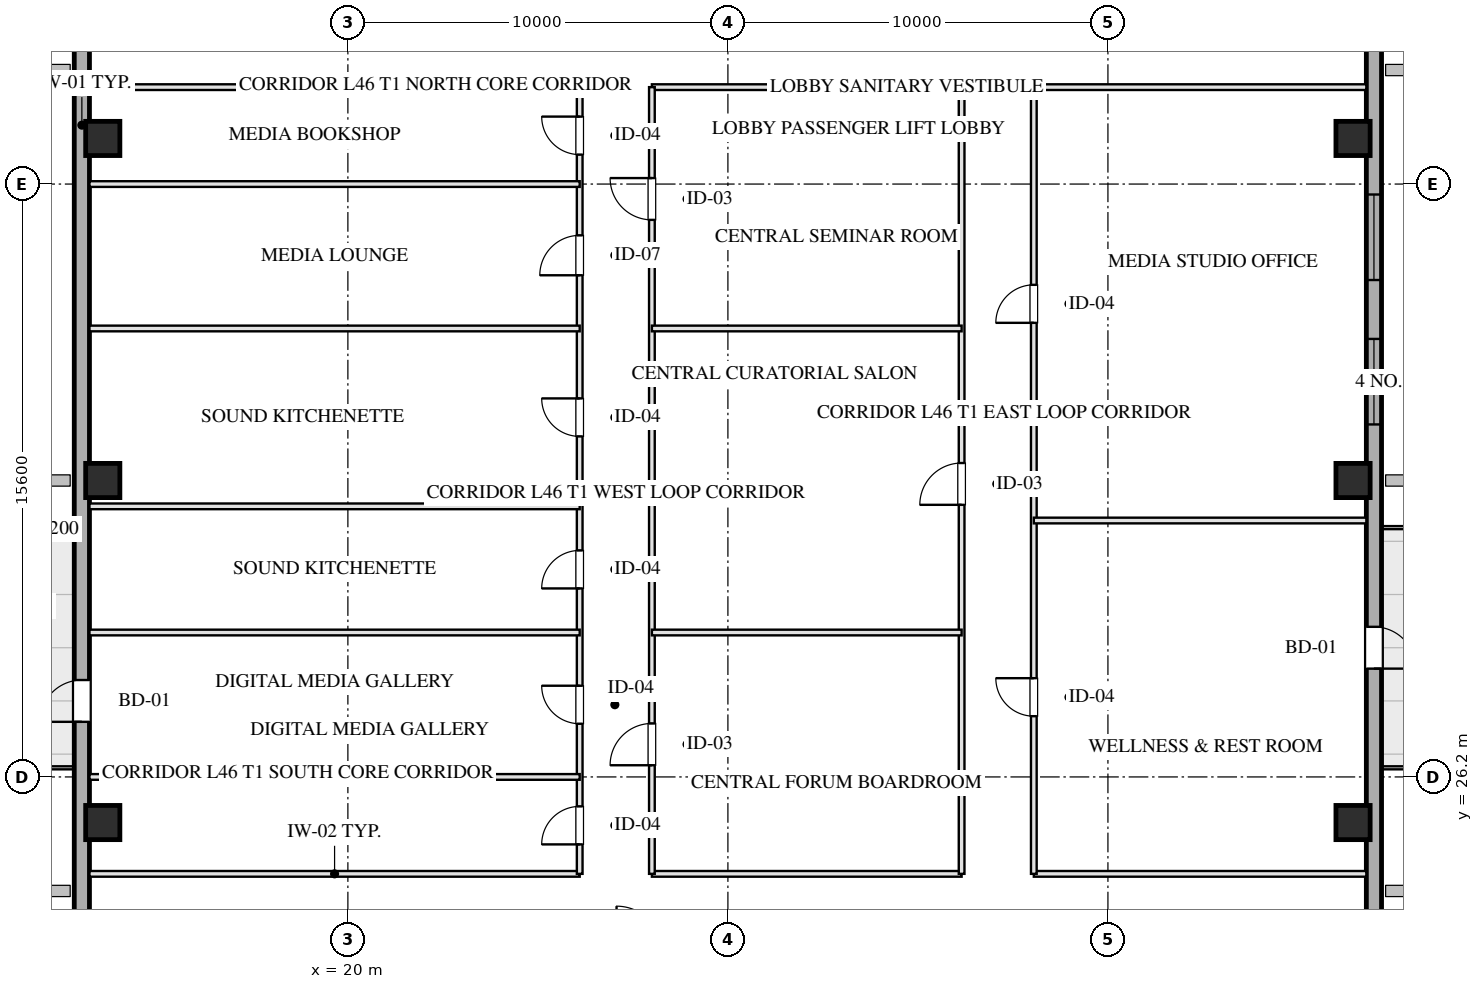
"""IFC4 building model, lengths in metres.
Left out: names, types, materials, properties, quantities, classifications, styles, units other than length and angle.
Written with IfcOpenShell. Run it as: python <this file> out.ifc"""

import sys

from ifc_helpers import new_model, si_unit, direction, frame, frame_2d, origin, origin_2d, place, context, subcontext, project, spatial, rectangle, hollow_rectangle, extrude, element, fill, save


model = new_model("IFC4")
c1 = context("Model", 3, precision=1e-05, world=origin(), true_north=direction((0.0, 1.0)))
c2 = subcontext(c1, "Body", "Model", "MODEL_VIEW")
j1 = project(units=[si_unit("LENGTHUNIT", "METRE"), si_unit("PLANEANGLEUNIT", "RADIAN")], contexts=[c1])
p1 = place(None, origin())
s1 = spatial("IfcSite", under=j1, at=p1, CompositionType="ELEMENT")
p2 = place(p1, origin())
s2 = spatial("IfcBuilding", under=s1, at=p2, CompositionType="ELEMENT")
p3 = place(p2, frame((0.0, 0.0, 173.65)))
s3 = spatial("IfcBuildingStorey", under=s2, at=p3, CompositionType="ELEMENT", Elevation=173.65)
for number, where, z_axis, x_axis in (
    (1, (13.55, 25.0, 0.0), (0.0, 0.0, 1.0), (1.0, 0.0, 0.0)),
    (2, (13.55, 34.0, 0.0), (0.0, 0.0, 1.0), (1.0, 0.0, 0.0)),
    (3, (13.55, 43.0, 0.0), (0.0, 0.0, 1.0), (1.0, 0.0, 0.0)),
    (4, (46.45, 25.0, 0.0), (0.0, 0.0, 1.0), (1.0, 0.0, 0.0)),
    (5, (46.45, 34.0, 0.0), (0.0, 0.0, 1.0), (1.0, 0.0, 0.0)),
    (6, (46.45, 43.0, 0.0), (0.0, 0.0, 1.0), (1.0, 0.0, 0.0)),
):
    element("IfcColumn", number, at=place(p3, frame(where, z_axis=z_axis, x_axis=x_axis)), inside=s3, PredefinedType="COLUMN", context=c2, shape_type="SweptSolid", body=[
        extrude(hollow_rectangle(XDim=0.9, YDim=0.9, WallThickness=0.032, at=origin_2d()), origin(), (0.0, 0.0, 1.0), 3.451),
    ])
p4 = place(p3, frame((13.0, 10.8, 0.0), z_axis=(0.0, 0.0, 1.0), x_axis=(0.0, 1.0, 0.0)))
e7 = element("IfcWall", 7, at=p4, inside=s3, PredefinedType="SOLIDWALL", context=c2, shape_type="SweptSolid", body=[
    extrude(rectangle(XDim=46.4, YDim=0.4, at=frame_2d((23.2, 0.0))), origin(), (0.0, 0.0, 1.0), 2.61),
])
p5 = place(p4, frame((16.85, 0.0, 0.0)))
e8 = element("IfcOpeningElement", 8, at=p5, cuts=e7, PredefinedType="OPENING", context=c2, shape_type="SweptSolid", body=[
    extrude(rectangle(XDim=1.1, YDim=2.15, at=frame_2d((0.55, 1.075))), frame((0.0, 0.21, 0.0), z_axis=(0.0, -1.0, 0.0), x_axis=(1.0, 0.0, 0.0)), (0.0, 0.0, 1.0), 0.42),
])
p6 = place(p3, frame((47.0, 57.2, 0.0), z_axis=(0.0, 0.0, 1.0), x_axis=(0.0, -1.0, 0.0)))
e9 = element("IfcWall", 9, at=p6, inside=s3, PredefinedType="SOLIDWALL", context=c2, shape_type="SweptSolid", body=[
    extrude(rectangle(XDim=46.4, YDim=0.4, at=frame_2d((23.2, 0.0))), origin(), (0.0, 0.0, 1.0), 2.61),
])
p7 = place(p6, frame((19.475, 0.0, 0.75)))
e10 = element("IfcOpeningElement", 10, at=p7, cuts=e9, PredefinedType="OPENING", context=c2, shape_type="SweptSolid", body=[
    extrude(rectangle(XDim=2.25, YDim=1.46, at=frame_2d((1.125, 0.73))), frame((0.0, 0.21, 0.0), z_axis=(0.0, -1.0, 0.0), x_axis=(1.0, 0.0, 0.0)), (0.0, 0.0, 1.0), 0.42),
])
p8 = place(p6, frame((15.675, 0.0, 0.75)))
e11 = element("IfcOpeningElement", 11, at=p8, cuts=e9, PredefinedType="OPENING", context=c2, shape_type="SweptSolid", body=[
    extrude(rectangle(XDim=2.25, YDim=1.46, at=frame_2d((1.125, 0.73))), frame((0.0, 0.21, 0.0), z_axis=(0.0, -1.0, 0.0), x_axis=(1.0, 0.0, 0.0)), (0.0, 0.0, 1.0), 0.42),
])
p9 = place(p6, frame((27.05, 0.0, 0.0)))
e12 = element("IfcOpeningElement", 12, at=p9, cuts=e9, PredefinedType="OPENING", context=c2, shape_type="SweptSolid", body=[
    extrude(rectangle(XDim=1.1, YDim=2.15, at=frame_2d((0.55, 1.075))), frame((0.0, 0.21, 0.0), z_axis=(0.0, -1.0, 0.0), x_axis=(1.0, 0.0, 0.0)), (0.0, 0.0, 1.0), 0.42),
])
p10 = place(p3, frame((13.2, 23.65, 0.0), z_axis=(0.0, 0.0, 1.0), x_axis=(1.0, 0.0, 0.0)))
e13 = element("IfcWall", 13, at=p10, inside=s3, PredefinedType="PARTITIONING", context=c2, shape_type="SweptSolid", body=[
    extrude(rectangle(XDim=12.9, YDim=0.15, at=frame_2d((6.45, 0.0))), origin(), (0.0, 0.0, 1.0), 3.175),
])
p11 = place(p3, frame((28.0, 23.65, 0.0), z_axis=(0.0, 0.0, 1.0), x_axis=(1.0, 0.0, 0.0)))
e14 = element("IfcWall", 14, at=p11, inside=s3, PredefinedType="PARTITIONING", context=c2, shape_type="SweptSolid", body=[
    extrude(rectangle(XDim=8.15, YDim=0.15, at=frame_2d((4.075, 0.0))), origin(), (0.0, 0.0, 1.0), 3.175),
])
p12 = place(p3, frame((38.05, 23.65, 0.0), z_axis=(0.0, 0.0, 1.0), x_axis=(1.0, 0.0, 0.0)))
e15 = element("IfcWall", 15, at=p12, inside=s3, PredefinedType="PARTITIONING", context=c2, shape_type="SweptSolid", body=[
    extrude(rectangle(XDim=8.75, YDim=0.15, at=frame_2d((4.375, 0.0))), origin(), (0.0, 0.0, 1.0), 3.175),
])
p13 = place(p3, frame((13.2, 44.35, 0.0), z_axis=(0.0, 0.0, 1.0), x_axis=(1.0, 0.0, 0.0)))
e16 = element("IfcWall", 16, at=p13, inside=s3, PredefinedType="PARTITIONING", context=c2, shape_type="SweptSolid", body=[
    extrude(rectangle(XDim=12.9, YDim=0.15, at=frame_2d((6.45, 0.0))), origin(), (0.0, 0.0, 1.0), 3.175),
])
p14 = place(p3, frame((28.0, 44.35, 0.0), z_axis=(0.0, 0.0, 1.0), x_axis=(1.0, 0.0, 0.0)))
e17 = element("IfcWall", 17, at=p14, inside=s3, PredefinedType="PARTITIONING", context=c2, shape_type="SweptSolid", body=[
    extrude(rectangle(XDim=8.15, YDim=0.15, at=frame_2d((4.075, 0.0))), origin(), (0.0, 0.0, 1.0), 3.175),
])
p15 = place(p3, frame((38.05, 44.35, 0.0), z_axis=(0.0, 0.0, 1.0), x_axis=(1.0, 0.0, 0.0)))
e18 = element("IfcWall", 18, at=p15, inside=s3, PredefinedType="PARTITIONING", context=c2, shape_type="SweptSolid", body=[
    extrude(rectangle(XDim=8.75, YDim=0.15, at=frame_2d((4.375, 0.0))), origin(), (0.0, 0.0, 1.0), 3.175),
])
p16 = place(p3, frame((26.1, 23.65, 0.0), z_axis=(0.0, 0.0, 1.0), x_axis=(0.0, 1.0, 0.0)))
e19 = element("IfcWall", 19, at=p16, inside=s3, PredefinedType="PARTITIONING", context=c2, shape_type="SweptSolid", body=[
    extrude(rectangle(XDim=20.7, YDim=0.15, at=frame_2d((10.35, 0.0))), origin(), (0.0, 0.0, 1.0), 3.175),
])
p17 = place(p16, frame((0.775, 0.0, 0.0)))
e20 = element("IfcOpeningElement", 20, at=p17, cuts=e19, PredefinedType="OPENING", context=c2, shape_type="SweptSolid", body=[
    extrude(rectangle(XDim=1.0, YDim=2.05, at=frame_2d((0.5, 1.025))), frame((0.0, 0.085, 0.0), z_axis=(0.0, -1.0, 0.0), x_axis=(1.0, 0.0, 0.0)), (0.0, 0.0, 1.0), 0.17),
])
p18 = place(p16, frame((3.95, 0.0, 0.0)))
e21 = element("IfcOpeningElement", 21, at=p18, cuts=e19, PredefinedType="OPENING", context=c2, shape_type="SweptSolid", body=[
    extrude(rectangle(XDim=1.0, YDim=2.05, at=frame_2d((0.5, 1.025))), frame((0.0, 0.085, 0.0), z_axis=(0.0, -1.0, 0.0), x_axis=(1.0, 0.0, 0.0)), (0.0, 0.0, 1.0), 0.17),
])
p19 = place(p16, frame((7.51, 0.0, 0.0)))
e22 = element("IfcOpeningElement", 22, at=p19, cuts=e19, PredefinedType="OPENING", context=c2, shape_type="SweptSolid", body=[
    extrude(rectangle(XDim=1.0, YDim=2.05, at=frame_2d((0.5, 1.025))), frame((0.0, 0.085, 0.0), z_axis=(0.0, -1.0, 0.0), x_axis=(1.0, 0.0, 0.0)), (0.0, 0.0, 1.0), 0.17),
])
p20 = place(p16, frame((11.51, 0.0, 0.0)))
e23 = element("IfcOpeningElement", 23, at=p20, cuts=e19, PredefinedType="OPENING", context=c2, shape_type="SweptSolid", body=[
    extrude(rectangle(XDim=1.0, YDim=2.05, at=frame_2d((0.5, 1.025))), frame((0.0, 0.085, 0.0), z_axis=(0.0, -1.0, 0.0), x_axis=(1.0, 0.0, 0.0)), (0.0, 0.0, 1.0), 0.17),
])
p21 = place(p16, frame((15.75, 0.0, 0.0)))
e24 = element("IfcOpeningElement", 24, at=p21, cuts=e19, PredefinedType="OPENING", context=c2, shape_type="SweptSolid", body=[
    extrude(rectangle(XDim=1.05, YDim=2.05, at=frame_2d((0.525, 1.025))), frame((0.0, 0.085, 0.0), z_axis=(0.0, -1.0, 0.0), x_axis=(1.0, 0.0, 0.0)), (0.0, 0.0, 1.0), 0.17),
])
p22 = place(p16, frame((18.925, 0.0, 0.0)))
e25 = element("IfcOpeningElement", 25, at=p22, cuts=e19, PredefinedType="OPENING", context=c2, shape_type="SweptSolid", body=[
    extrude(rectangle(XDim=1.0, YDim=2.05, at=frame_2d((0.5, 1.025))), frame((0.0, 0.085, 0.0), z_axis=(0.0, -1.0, 0.0), x_axis=(1.0, 0.0, 0.0)), (0.0, 0.0, 1.0), 0.17),
])
p23 = place(p3, frame((28.0, 23.65, 0.0), z_axis=(0.0, 0.0, 1.0), x_axis=(0.0, 1.0, 0.0)))
e26 = element("IfcWall", 26, at=p23, inside=s3, PredefinedType="PARTITIONING", context=c2, shape_type="SweptSolid", body=[
    extrude(rectangle(XDim=20.7, YDim=0.15, at=frame_2d((10.35, 0.0))), origin(), (0.0, 0.0, 1.0), 3.175),
])
p24 = place(p23, frame((2.857, 0.0, 0.0)))
e27 = element("IfcOpeningElement", 27, at=p24, cuts=e26, PredefinedType="OPENING", context=c2, shape_type="SweptSolid", body=[
    extrude(rectangle(XDim=1.1, YDim=2.05, at=frame_2d((0.55, 1.025))), frame((0.0, 0.085, 0.0), z_axis=(0.0, -1.0, 0.0), x_axis=(1.0, 0.0, 0.0)), (0.0, 0.0, 1.0), 0.17),
])
p25 = place(p23, frame((17.208, 0.0, 0.0)))
e28 = element("IfcOpeningElement", 28, at=p25, cuts=e26, PredefinedType="OPENING", context=c2, shape_type="SweptSolid", body=[
    extrude(rectangle(XDim=1.1, YDim=2.05, at=frame_2d((0.55, 1.025))), frame((0.0, 0.085, 0.0), z_axis=(0.0, -1.0, 0.0), x_axis=(1.0, 0.0, 0.0)), (0.0, 0.0, 1.0), 0.17),
])
p26 = place(p3, frame((36.15, 23.65, 0.0), z_axis=(0.0, 0.0, 1.0), x_axis=(0.0, 1.0, 0.0)))
e29 = element("IfcWall", 29, at=p26, inside=s3, PredefinedType="PARTITIONING", context=c2, shape_type="SweptSolid", body=[
    extrude(rectangle(XDim=20.7, YDim=0.15, at=frame_2d((10.35, 0.0))), origin(), (0.0, 0.0, 1.0), 3.175),
])
p27 = place(p26, frame((9.71, 0.0, 0.0)))
e30 = element("IfcOpeningElement", 30, at=p27, cuts=e29, PredefinedType="OPENING", context=c2, shape_type="SweptSolid", body=[
    extrude(rectangle(XDim=1.1, YDim=2.05, at=frame_2d((0.55, 1.025))), frame((0.0, 0.085, 0.0), z_axis=(0.0, -1.0, 0.0), x_axis=(1.0, 0.0, 0.0)), (0.0, 0.0, 1.0), 0.17),
])
p28 = place(p3, frame((38.05, 23.65, 0.0), z_axis=(0.0, 0.0, 1.0), x_axis=(0.0, 1.0, 0.0)))
e31 = element("IfcWall", 31, at=p28, inside=s3, PredefinedType="PARTITIONING", context=c2, shape_type="SweptSolid", body=[
    extrude(rectangle(XDim=20.7, YDim=0.15, at=frame_2d((10.35, 0.0))), origin(), (0.0, 0.0, 1.0), 3.175),
])
p29 = place(p28, frame((4.148, 0.0, 0.0)))
e32 = element("IfcOpeningElement", 32, at=p29, cuts=e31, PredefinedType="OPENING", context=c2, shape_type="SweptSolid", body=[
    extrude(rectangle(XDim=1.0, YDim=2.05, at=frame_2d((0.5, 1.025))), frame((0.0, 0.085, 0.0), z_axis=(0.0, -1.0, 0.0), x_axis=(1.0, 0.0, 0.0)), (0.0, 0.0, 1.0), 0.17),
])
p30 = place(p28, frame((14.499, 0.0, 0.0)))
e33 = element("IfcOpeningElement", 33, at=p30, cuts=e31, PredefinedType="OPENING", context=c2, shape_type="SweptSolid", body=[
    extrude(rectangle(XDim=1.0, YDim=2.05, at=frame_2d((0.5, 1.025))), frame((0.0, 0.085, 0.0), z_axis=(0.0, -1.0, 0.0), x_axis=(1.0, 0.0, 0.0)), (0.0, 0.0, 1.0), 0.17),
])
for number, where, z_axis, x_axis in (
    (34, (28.0, 30.0, 0.0), (0.0, 0.0, 1.0), (1.0, 0.0, 0.0)),
    (35, (28.0, 38.0, 0.0), (0.0, 0.0, 1.0), (1.0, 0.0, 0.0)),
):
    element("IfcWall", number, at=place(p3, frame(where, z_axis=z_axis, x_axis=x_axis)), inside=s3, PredefinedType="PARTITIONING", context=c2, shape_type="SweptSolid", body=[
        extrude(rectangle(XDim=8.15, YDim=0.15, at=frame_2d((4.075, 0.0))), origin(), (0.0, 0.0, 1.0), 3.175),
    ])
for number, where, z_axis, x_axis in (
    (36, (13.2, 26.2, 0.0), (0.0, 0.0, 1.0), (1.0, 0.0, 0.0)),
    (37, (13.2, 30.0, 0.0), (0.0, 0.0, 1.0), (1.0, 0.0, 0.0)),
    (38, (13.2, 33.32, 0.0), (0.0, 0.0, 1.0), (1.0, 0.0, 0.0)),
    (39, (13.2, 38.0, 0.0), (0.0, 0.0, 1.0), (1.0, 0.0, 0.0)),
    (40, (13.2, 41.8, 0.0), (0.0, 0.0, 1.0), (1.0, 0.0, 0.0)),
):
    element("IfcWall", number, at=place(p3, frame(where, z_axis=z_axis, x_axis=x_axis)), inside=s3, PredefinedType="PARTITIONING", context=c2, shape_type="SweptSolid", body=[
        extrude(rectangle(XDim=12.9, YDim=0.15, at=frame_2d((6.45, 0.0))), origin(), (0.0, 0.0, 1.0), 3.175),
    ])
p31 = place(p3, frame((38.05, 32.947, 0.0), z_axis=(0.0, 0.0, 1.0), x_axis=(1.0, 0.0, 0.0)))
e41 = element("IfcWall", 41, at=p31, inside=s3, PredefinedType="PARTITIONING", context=c2, shape_type="SweptSolid", body=[
    extrude(rectangle(XDim=8.75, YDim=0.15, at=frame_2d((4.375, 0.0))), origin(), (0.0, 0.0, 1.0), 3.175),
])
p32 = place(p7, origin())
e42 = element("IfcWindow", 42, at=p32, inside=s3, PartitioningType="TRIPLE_PANEL_VERTICAL", PredefinedType="WINDOW", context=c2, shape_type="SweptSolid", body=[
    extrude(rectangle(XDim=2.25, YDim=1.46, at=frame_2d((1.125, 0.73))), frame((0.0, 0.03, 0.0), z_axis=(0.0, -1.0, 0.0), x_axis=(1.0, 0.0, 0.0)), (0.0, 0.0, 1.0), 0.06),
])
fill(e10, e42)
p33 = place(p8, origin())
e43 = element("IfcWindow", 43, at=p33, inside=s3, PartitioningType="TRIPLE_PANEL_VERTICAL", PredefinedType="WINDOW", context=c2, shape_type="SweptSolid", body=[
    extrude(rectangle(XDim=2.25, YDim=1.46, at=frame_2d((1.125, 0.73))), frame((0.0, 0.03, 0.0), z_axis=(0.0, -1.0, 0.0), x_axis=(1.0, 0.0, 0.0)), (0.0, 0.0, 1.0), 0.06),
])
fill(e11, e43)
p34 = place(p5, origin())
e44 = element("IfcDoor", 44, at=p34, inside=s3, OperationType="SINGLE_SWING_LEFT", PredefinedType="DOOR", context=c2, shape_type="SweptSolid", body=[
    extrude(rectangle(XDim=1.1, YDim=2.15, at=frame_2d((0.55, 1.075))), frame((0.0, 0.025, 0.0), z_axis=(0.0, -1.0, 0.0), x_axis=(1.0, 0.0, 0.0)), (0.0, 0.0, 1.0), 0.05),
])
fill(e8, e44)
p35 = place(p9, origin())
e45 = element("IfcDoor", 45, at=p35, inside=s3, OperationType="SINGLE_SWING_RIGHT", PredefinedType="DOOR", context=c2, shape_type="SweptSolid", body=[
    extrude(rectangle(XDim=1.1, YDim=2.15, at=frame_2d((0.55, 1.075))), frame((0.0, 0.025, 0.0), z_axis=(0.0, -1.0, 0.0), x_axis=(1.0, 0.0, 0.0)), (0.0, 0.0, 1.0), 0.05),
])
fill(e12, e45)
p36 = place(p17, origin())
e46 = element("IfcDoor", 46, at=p36, inside=s3, OperationType="SINGLE_SWING_LEFT", PredefinedType="DOOR", context=c2, shape_type="SweptSolid", body=[
    extrude(rectangle(XDim=1.0, YDim=2.05, at=frame_2d((0.5, 1.025))), frame((0.0, 0.025, 0.0), z_axis=(0.0, -1.0, 0.0), x_axis=(1.0, 0.0, 0.0)), (0.0, 0.0, 1.0), 0.05),
])
fill(e20, e46)
p37 = place(p18, origin())
e47 = element("IfcDoor", 47, at=p37, inside=s3, OperationType="SINGLE_SWING_RIGHT", PredefinedType="DOOR", context=c2, shape_type="SweptSolid", body=[
    extrude(rectangle(XDim=1.0, YDim=2.05, at=frame_2d((0.5, 1.025))), frame((0.0, 0.025, 0.0), z_axis=(0.0, -1.0, 0.0), x_axis=(1.0, 0.0, 0.0)), (0.0, 0.0, 1.0), 0.05),
])
fill(e21, e47)
p38 = place(p19, origin())
e48 = element("IfcDoor", 48, at=p38, inside=s3, OperationType="SINGLE_SWING_LEFT", PredefinedType="DOOR", context=c2, shape_type="SweptSolid", body=[
    extrude(rectangle(XDim=1.0, YDim=2.05, at=frame_2d((0.5, 1.025))), frame((0.0, 0.025, 0.0), z_axis=(0.0, -1.0, 0.0), x_axis=(1.0, 0.0, 0.0)), (0.0, 0.0, 1.0), 0.05),
])
fill(e22, e48)
p39 = place(p20, origin())
e49 = element("IfcDoor", 49, at=p39, inside=s3, OperationType="SINGLE_SWING_RIGHT", PredefinedType="DOOR", context=c2, shape_type="SweptSolid", body=[
    extrude(rectangle(XDim=1.0, YDim=2.05, at=frame_2d((0.5, 1.025))), frame((0.0, 0.025, 0.0), z_axis=(0.0, -1.0, 0.0), x_axis=(1.0, 0.0, 0.0)), (0.0, 0.0, 1.0), 0.05),
])
fill(e23, e49)
p40 = place(p21, origin())
e50 = element("IfcDoor", 50, at=p40, inside=s3, OperationType="SINGLE_SWING_LEFT", PredefinedType="DOOR", context=c2, shape_type="SweptSolid", body=[
    extrude(rectangle(XDim=1.05, YDim=2.05, at=frame_2d((0.525, 1.025))), frame((0.0, 0.025, 0.0), z_axis=(0.0, -1.0, 0.0), x_axis=(1.0, 0.0, 0.0)), (0.0, 0.0, 1.0), 0.05),
])
fill(e24, e50)
p41 = place(p22, origin())
e51 = element("IfcDoor", 51, at=p41, inside=s3, OperationType="SINGLE_SWING_RIGHT", PredefinedType="DOOR", context=c2, shape_type="SweptSolid", body=[
    extrude(rectangle(XDim=1.0, YDim=2.05, at=frame_2d((0.5, 1.025))), frame((0.0, 0.025, 0.0), z_axis=(0.0, -1.0, 0.0), x_axis=(1.0, 0.0, 0.0)), (0.0, 0.0, 1.0), 0.05),
])
fill(e25, e51)
p42 = place(p24, origin())
e52 = element("IfcDoor", 52, at=p42, inside=s3, OperationType="SINGLE_SWING_LEFT", PredefinedType="DOOR", context=c2, shape_type="SweptSolid", body=[
    extrude(rectangle(XDim=1.1, YDim=2.05, at=frame_2d((0.55, 1.025))), frame((0.0, 0.025, 0.0), z_axis=(0.0, -1.0, 0.0), x_axis=(1.0, 0.0, 0.0)), (0.0, 0.0, 1.0), 0.05),
])
fill(e27, e52)
p43 = place(p25, origin())
e53 = element("IfcDoor", 53, at=p43, inside=s3, OperationType="SINGLE_SWING_RIGHT", PredefinedType="DOOR", context=c2, shape_type="SweptSolid", body=[
    extrude(rectangle(XDim=1.1, YDim=2.05, at=frame_2d((0.55, 1.025))), frame((0.0, 0.025, 0.0), z_axis=(0.0, -1.0, 0.0), x_axis=(1.0, 0.0, 0.0)), (0.0, 0.0, 1.0), 0.05),
])
fill(e28, e53)
p44 = place(p27, origin())
e54 = element("IfcDoor", 54, at=p44, inside=s3, OperationType="SINGLE_SWING_LEFT", PredefinedType="DOOR", context=c2, shape_type="SweptSolid", body=[
    extrude(rectangle(XDim=1.1, YDim=2.05, at=frame_2d((0.55, 1.025))), frame((0.0, 0.025, 0.0), z_axis=(0.0, -1.0, 0.0), x_axis=(1.0, 0.0, 0.0)), (0.0, 0.0, 1.0), 0.05),
])
fill(e30, e54)
p45 = place(p29, origin())
e55 = element("IfcDoor", 55, at=p45, inside=s3, OperationType="SINGLE_SWING_RIGHT", PredefinedType="DOOR", context=c2, shape_type="SweptSolid", body=[
    extrude(rectangle(XDim=1.0, YDim=2.05, at=frame_2d((0.5, 1.025))), frame((0.0, 0.025, 0.0), z_axis=(0.0, -1.0, 0.0), x_axis=(1.0, 0.0, 0.0)), (0.0, 0.0, 1.0), 0.05),
])
fill(e32, e55)
p46 = place(p30, origin())
e56 = element("IfcDoor", 56, at=p46, inside=s3, OperationType="SINGLE_SWING_LEFT", PredefinedType="DOOR", context=c2, shape_type="SweptSolid", body=[
    extrude(rectangle(XDim=1.0, YDim=2.05, at=frame_2d((0.5, 1.025))), frame((0.0, 0.025, 0.0), z_axis=(0.0, -1.0, 0.0), x_axis=(1.0, 0.0, 0.0)), (0.0, 0.0, 1.0), 0.05),
])
fill(e33, e56)
save(model, sys.argv[1])
